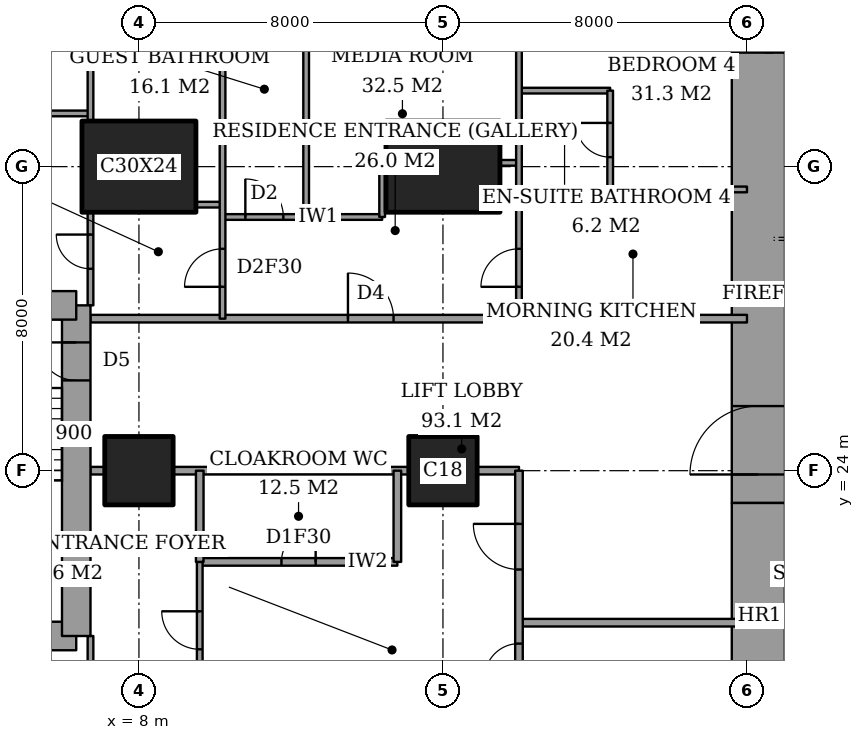
"""IFC4 building model, lengths in metres.
Left out: names, types, materials, properties, quantities, classifications, styles, units other than length and angle.
Written with IfcOpenShell. Run it as: python <this file> out.ifc"""

import sys

from ifc_helpers import new_model, si_unit, direction, frame, frame_2d, origin, origin_2d, place, context, subcontext, project, spatial, rectangle, extrude, element, fill, save


model = new_model("IFC4")
c1 = context("Model", 3, precision=1e-05, world=origin(), true_north=direction((0.0, 1.0)))
c2 = subcontext(c1, "Body", "Model", "MODEL_VIEW")
j1 = project(units=[si_unit("LENGTHUNIT", "METRE"), si_unit("PLANEANGLEUNIT", "RADIAN")], contexts=[c1])
p1 = place(None, origin())
s1 = spatial("IfcSite", under=j1, at=p1, CompositionType="ELEMENT")
p2 = place(p1, origin())
s2 = spatial("IfcBuilding", under=s1, at=p2, CompositionType="ELEMENT")
p3 = place(p2, frame((0.0, 0.0, 211.0)))
s3 = spatial("IfcBuildingStorey", under=s2, at=p3, CompositionType="ELEMENT", Elevation=211.0)
p4 = place(p3, frame((8.0, 24.0, 0.0), z_axis=(0.0, 0.0, 1.0), x_axis=(1.0, 0.0, 0.0)))
e1 = element("IfcColumn", 1, at=p4, inside=s3, PredefinedType="COLUMN", context=c2, shape_type="SweptSolid", body=[
    extrude(rectangle(XDim=1.8, YDim=1.8, at=origin_2d()), origin(), (0.0, 0.0, 1.0), 3.6),
])
p5 = place(p3, frame((8.0, 32.0, 0.0), z_axis=(0.0, 0.0, 1.0), x_axis=(1.0, 0.0, 0.0)))
e2 = element("IfcColumn", 2, at=p5, inside=s3, PredefinedType="COLUMN", context=c2, shape_type="SweptSolid", body=[
    extrude(rectangle(XDim=3.0, YDim=2.4, at=origin_2d()), origin(), (0.0, 0.0, 1.0), 3.6),
])
p6 = place(p3, frame((16.0, 24.0, 0.0), z_axis=(0.0, 0.0, 1.0), x_axis=(1.0, 0.0, 0.0)))
e3 = element("IfcColumn", 3, at=p6, inside=s3, PredefinedType="COLUMN", context=c2, shape_type="SweptSolid", body=[
    extrude(rectangle(XDim=1.8, YDim=1.8, at=origin_2d()), origin(), (0.0, 0.0, 1.0), 3.6),
])
p7 = place(p3, frame((16.0, 32.0, 0.0), z_axis=(0.0, 0.0, 1.0), x_axis=(1.0, 0.0, 0.0)))
e4 = element("IfcColumn", 4, at=p7, inside=s3, PredefinedType="COLUMN", context=c2, shape_type="SweptSolid", body=[
    extrude(rectangle(XDim=3.0, YDim=2.4, at=origin_2d()), origin(), (0.0, 0.0, 1.0), 3.6),
])
p8 = place(p3, frame((24.3, 13.0, 0.0), z_axis=(0.0, 0.0, 1.0), x_axis=(0.0, 1.0, 0.0)))
e5 = element("IfcWall", 5, at=p8, inside=s3, PredefinedType="SHEAR", context=c2, shape_type="SweptSolid", body=[
    extrude(rectangle(XDim=10.15, YDim=1.4, at=frame_2d((5.075, 0.0))), origin(), (0.0, 0.0, 1.0), 3.6),
])
p9 = place(p3, frame((24.3, 23.15, 0.0), z_axis=(0.0, 0.0, 1.0), x_axis=(0.0, 1.0, 0.0)))
e6 = element("IfcWall", 6, at=p9, inside=s3, PredefinedType="SHEAR", context=c2, shape_type="SweptSolid", body=[
    extrude(rectangle(XDim=11.85, YDim=1.4, at=frame_2d((5.925, 0.0))), origin(), (0.0, 0.0, 1.0), 3.6),
])
p10 = place(p9, frame((0.75, 0.0, 0.0)))
e7 = element("IfcOpeningElement", 7, at=p10, cuts=e6, PredefinedType="OPENING", context=c2, shape_type="SweptSolid", body=[
    extrude(rectangle(XDim=1.8, YDim=2.4, at=frame_2d((0.9, 1.2))), frame((0.0, 0.71, 0.0), z_axis=(0.0, -1.0, 0.0), x_axis=(1.0, 0.0, 0.0)), (0.0, 0.0, 1.0), 1.42),
])
p11 = place(p3, frame((1.9, 19.65, 0.0), z_axis=(0.0, 0.0, 1.0), x_axis=(1.0, 0.0, 0.0)))
e8 = element("IfcWall", 8, at=p11, inside=s3, PredefinedType="SHEAR", context=c2, shape_type="SweptSolid", body=[
    extrude(rectangle(XDim=4.45, YDim=0.75, at=frame_2d((2.225, 0.0))), origin(), (0.0, 0.0, 1.0), 3.6),
])
p12 = place(p3, frame((6.35, 19.65, 0.0), z_axis=(0.0, 0.0, 1.0), x_axis=(0.0, 1.0, 0.0)))
e9 = element("IfcWall", 9, at=p12, inside=s3, PredefinedType="SHEAR", context=c2, shape_type="SweptSolid", body=[
    extrude(rectangle(XDim=8.7, YDim=0.75, at=frame_2d((4.35, 0.0))), origin(), (0.0, 0.0, 1.0), 3.6),
])
p13 = place(p12, frame((6.725, 0.0, 0.0)))
e10 = element("IfcOpeningElement", 10, at=p13, cuts=e9, PredefinedType="OPENING", context=c2, shape_type="SweptSolid", body=[
    extrude(rectangle(XDim=1.0, YDim=2.1, at=frame_2d((0.5, 1.05))), frame((0.0, 0.385, 0.0), z_axis=(0.0, -1.0, 0.0), x_axis=(1.0, 0.0, 0.0)), (0.0, 0.0, 1.0), 0.77),
])
p14 = place(p3, frame((6.35, 28.35, 0.0), z_axis=(0.0, 0.0, 1.0), x_axis=(-1.0, 0.0, 0.0)))
e11 = element("IfcWall", 11, at=p14, inside=s3, PredefinedType="SHEAR", context=c2, shape_type="SweptSolid", body=[
    extrude(rectangle(XDim=4.45, YDim=0.75, at=frame_2d((2.225, 0.0))), origin(), (0.0, 0.0, 1.0), 3.6),
])
p15 = place(p3, frame((18.0, 20.0, 0.0), z_axis=(0.0, 0.0, 1.0), x_axis=(1.0, 0.0, 0.0)))
e12 = element("IfcWall", 12, at=p15, inside=s3, PredefinedType="PARTITIONING", context=c2, shape_type="SweptSolid", body=[
    extrude(rectangle(XDim=6.0, YDim=0.2, at=frame_2d((3.0, 0.0))), origin(), (0.0, 0.0, 1.0), 3.35),
])
p16 = place(p3, frame((9.6, 21.6, 0.0), z_axis=(0.0, 0.0, 1.0), x_axis=(1.0, 0.0, 0.0)))
e13 = element("IfcWall", 13, at=p16, inside=s3, PredefinedType="PARTITIONING", context=c2, shape_type="SweptSolid", body=[
    extrude(rectangle(XDim=5.2, YDim=0.2, at=frame_2d((2.6, 0.0))), origin(), (0.0, 0.0, 1.0), 3.35),
])
p17 = place(p16, frame((2.15, 0.0, 0.0)))
e14 = element("IfcOpeningElement", 14, at=p17, cuts=e13, PredefinedType="OPENING", context=c2, shape_type="SweptSolid", body=[
    extrude(rectangle(XDim=0.9, YDim=2.1, at=frame_2d((0.45, 1.05))), frame((0.0, 0.11, 0.0), z_axis=(0.0, -1.0, 0.0), x_axis=(1.0, 0.0, 0.0)), (0.0, 0.0, 1.0), 0.22),
])
p18 = place(p3, frame((6.725, 24.0, 0.0), z_axis=(0.0, 0.0, 1.0), x_axis=(1.0, 0.0, 0.0)))
e15 = element("IfcWall", 15, at=p18, inside=s3, PredefinedType="PARTITIONING", context=c2, shape_type="SweptSolid", body=[
    extrude(rectangle(XDim=0.375, YDim=0.2, at=frame_2d((0.188, 0.0))), origin(), (0.0, 0.0, 1.0), 3.35),
])
p19 = place(p3, frame((8.9, 24.0, 0.0), z_axis=(0.0, 0.0, 1.0), x_axis=(1.0, 0.0, 0.0)))
e16 = element("IfcWall", 16, at=p19, inside=s3, PredefinedType="PARTITIONING", context=c2, shape_type="SweptSolid", body=[
    extrude(rectangle(XDim=6.2, YDim=0.2, at=frame_2d((3.1, 0.0))), origin(), (0.0, 0.0, 1.0), 3.35),
])
p20 = place(p3, frame((16.9, 24.0, 0.0), z_axis=(0.0, 0.0, 1.0), x_axis=(1.0, 0.0, 0.0)))
e17 = element("IfcWall", 17, at=p20, inside=s3, PredefinedType="PARTITIONING", context=c2, shape_type="SweptSolid", body=[
    extrude(rectangle(XDim=1.1, YDim=0.2, at=frame_2d((0.55, 0.0))), origin(), (0.0, 0.0, 1.0), 3.35),
])
p21 = place(p3, frame((6.725, 28.0, 0.0), z_axis=(0.0, 0.0, 1.0), x_axis=(1.0, 0.0, 0.0)))
e18 = element("IfcWall", 18, at=p21, inside=s3, PredefinedType="PARTITIONING", context=c2, shape_type="SweptSolid", body=[
    extrude(rectangle(XDim=17.275, YDim=0.2, at=frame_2d((8.637, 0.0))), origin(), (0.0, 0.0, 1.0), 3.35),
])
p22 = place(p21, frame((6.775, 0.0, 0.0)))
e19 = element("IfcOpeningElement", 19, at=p22, cuts=e18, PredefinedType="OPENING", context=c2, shape_type="SweptSolid", body=[
    extrude(rectangle(XDim=1.2, YDim=2.4, at=frame_2d((0.6, 1.2))), frame((0.0, 0.11, 0.0), z_axis=(0.0, -1.0, 0.0), x_axis=(1.0, 0.0, 0.0)), (0.0, 0.0, 1.0), 0.22),
])
p23 = place(p3, frame((10.2, 30.675, 0.0), z_axis=(0.0, 0.0, 1.0), x_axis=(1.0, 0.0, 0.0)))
e20 = element("IfcWall", 20, at=p23, inside=s3, PredefinedType="PARTITIONING", context=c2, shape_type="SweptSolid", body=[
    extrude(rectangle(XDim=4.2, YDim=0.15, at=frame_2d((2.1, 0.0))), origin(), (0.0, 0.0, 1.0), 3.35),
])
p24 = place(p23, frame((0.6, 0.0, 0.0)))
e21 = element("IfcOpeningElement", 21, at=p24, cuts=e20, PredefinedType="OPENING", context=c2, shape_type="SweptSolid", body=[
    extrude(rectangle(XDim=1.0, YDim=2.1, at=frame_2d((0.5, 1.05))), frame((0.0, 0.085, 0.0), z_axis=(0.0, -1.0, 0.0), x_axis=(1.0, 0.0, 0.0)), (0.0, 0.0, 1.0), 0.17),
])
p25 = place(p3, frame((9.5, 31.0, 0.0), z_axis=(0.0, 0.0, 1.0), x_axis=(1.0, 0.0, 0.0)))
e22 = element("IfcWall", 22, at=p25, inside=s3, PredefinedType="PARTITIONING", context=c2, shape_type="SweptSolid", body=[
    extrude(rectangle(XDim=0.7, YDim=0.15, at=frame_2d((0.35, 0.0))), origin(), (0.0, 0.0, 1.0), 3.35),
])
p26 = place(p3, frame((18.0, 31.4, 0.0), z_axis=(0.0, 0.0, 1.0), x_axis=(1.0, 0.0, 0.0)))
e23 = element("IfcWall", 23, at=p26, inside=s3, PredefinedType="PARTITIONING", context=c2, shape_type="SweptSolid", body=[
    extrude(rectangle(XDim=6.0, YDim=0.15, at=frame_2d((3.0, 0.0))), origin(), (0.0, 0.0, 1.0), 3.35),
])
p27 = place(p3, frame((17.5, 32.1, 0.0), z_axis=(0.0, 0.0, 1.0), x_axis=(1.0, 0.0, 0.0)))
e24 = element("IfcWall", 24, at=p27, inside=s3, PredefinedType="PARTITIONING", context=c2, shape_type="SweptSolid", body=[
    extrude(rectangle(XDim=0.5, YDim=0.15, at=frame_2d((0.25, 0.0))), origin(), (0.0, 0.0, 1.0), 2.634),
])
p28 = place(p3, frame((-0.45, 33.4, 0.0), z_axis=(0.0, 0.0, 1.0), x_axis=(1.0, 0.0, 0.0)))
e25 = element("IfcWall", 25, at=p28, inside=s3, PredefinedType="PARTITIONING", context=c2, shape_type="SweptSolid", body=[
    extrude(rectangle(XDim=7.175, YDim=0.15, at=frame_2d((3.587, 0.0))), origin(), (0.0, 0.0, 1.0), 3.35),
])
p29 = place(p3, frame((18.0, 34.0, 0.0), z_axis=(0.0, 0.0, 1.0), x_axis=(1.0, 0.0, 0.0)))
e26 = element("IfcWall", 26, at=p29, inside=s3, PredefinedType="PARTITIONING", context=c2, shape_type="SweptSolid", body=[
    extrude(rectangle(XDim=2.4, YDim=0.15, at=frame_2d((1.2, 0.0))), origin(), (0.0, 0.0, 1.0), 3.35),
])
p30 = place(p3, frame((6.725, 17.2, 0.0), z_axis=(0.0, 0.0, 1.0), x_axis=(0.0, 1.0, 0.0)))
e27 = element("IfcWall", 27, at=p30, inside=s3, PredefinedType="PARTITIONING", context=c2, shape_type="SweptSolid", body=[
    extrude(rectangle(XDim=2.45, YDim=0.15, at=frame_2d((1.225, 0.0))), origin(), (0.0, 0.0, 1.0), 3.35),
])
p31 = place(p30, frame((0.587, 0.0, 0.0)))
e28 = element("IfcOpeningElement", 28, at=p31, cuts=e27, PredefinedType="OPENING", context=c2, shape_type="SweptSolid", body=[
    extrude(rectangle(XDim=0.9, YDim=2.1, at=frame_2d((0.45, 1.05))), frame((0.0, 0.085, 0.0), z_axis=(0.0, -1.0, 0.0), x_axis=(1.0, 0.0, 0.0)), (0.0, 0.0, 1.0), 0.17),
])
p32 = place(p3, frame((6.725, 28.35, 0.0), z_axis=(0.0, 0.0, 1.0), x_axis=(0.0, 1.0, 0.0)))
e29 = element("IfcWall", 29, at=p32, inside=s3, PredefinedType="PARTITIONING", context=c2, shape_type="SweptSolid", body=[
    extrude(rectangle(XDim=2.45, YDim=0.15, at=frame_2d((1.225, 0.0))), origin(), (0.0, 0.0, 1.0), 3.35),
])
p33 = place(p32, frame((0.962, 0.0, 0.0)))
e30 = element("IfcOpeningElement", 30, at=p33, cuts=e29, PredefinedType="OPENING", context=c2, shape_type="SweptSolid", body=[
    extrude(rectangle(XDim=0.9, YDim=2.1, at=frame_2d((0.45, 1.05))), frame((0.0, 0.085, 0.0), z_axis=(0.0, -1.0, 0.0), x_axis=(1.0, 0.0, 0.0)), (0.0, 0.0, 1.0), 0.17),
])
p34 = place(p3, frame((6.725, 33.2, 0.0), z_axis=(0.0, 0.0, 1.0), x_axis=(0.0, 1.0, 0.0)))
e31 = element("IfcWall", 31, at=p34, inside=s3, PredefinedType="PARTITIONING", context=c2, shape_type="SweptSolid", body=[
    extrude(rectangle(XDim=4.2, YDim=0.15, at=frame_2d((2.1, 0.0))), origin(), (0.0, 0.0, 1.0), 3.35),
])
p35 = place(p3, frame((9.6, 21.6, 0.0), z_axis=(0.0, 0.0, 1.0), x_axis=(0.0, 1.0, 0.0)))
e32 = element("IfcWall", 32, at=p35, inside=s3, PredefinedType="PARTITIONING", context=c2, shape_type="SweptSolid", body=[
    extrude(rectangle(XDim=2.4, YDim=0.2, at=frame_2d((1.2, 0.0))), origin(), (0.0, 0.0, 1.0), 3.35),
])
p36 = place(p3, frame((9.6, 10.6, 0.0), z_axis=(0.0, 0.0, 1.0), x_axis=(0.0, 1.0, 0.0)))
e33 = element("IfcWall", 33, at=p36, inside=s3, PredefinedType="PARTITIONING", context=c2, shape_type="SweptSolid", body=[
    extrude(rectangle(XDim=11.0, YDim=0.15, at=frame_2d((5.5, 0.0))), origin(), (0.0, 0.0, 1.0), 3.35),
])
p37 = place(p36, frame((8.7, 0.0, 0.0)))
e34 = element("IfcOpeningElement", 34, at=p37, cuts=e33, PredefinedType="OPENING", context=c2, shape_type="SweptSolid", body=[
    extrude(rectangle(XDim=1.0, YDim=2.1, at=frame_2d((0.5, 1.05))), frame((0.0, 0.085, 0.0), z_axis=(0.0, -1.0, 0.0), x_axis=(1.0, 0.0, 0.0)), (0.0, 0.0, 1.0), 0.17),
])
p38 = place(p3, frame((10.2, 28.0, 0.0), z_axis=(0.0, 0.0, 1.0), x_axis=(0.0, 1.0, 0.0)))
e35 = element("IfcWall", 35, at=p38, inside=s3, PredefinedType="PARTITIONING", context=c2, shape_type="SweptSolid", body=[
    extrude(rectangle(XDim=9.4, YDim=0.15, at=frame_2d((4.7, 0.0))), origin(), (0.0, 0.0, 1.0), 3.35),
])
p39 = place(p38, frame((0.837, 0.0, 0.0)))
e36 = element("IfcOpeningElement", 36, at=p39, cuts=e35, PredefinedType="OPENING", context=c2, shape_type="SweptSolid", body=[
    extrude(rectangle(XDim=1.0, YDim=2.1, at=frame_2d((0.5, 1.05))), frame((0.0, 0.085, 0.0), z_axis=(0.0, -1.0, 0.0), x_axis=(1.0, 0.0, 0.0)), (0.0, 0.0, 1.0), 0.17),
])
p40 = place(p3, frame((12.4, 30.675, 0.0), z_axis=(0.0, 0.0, 1.0), x_axis=(0.0, 1.0, 0.0)))
e37 = element("IfcWall", 37, at=p40, inside=s3, PredefinedType="PARTITIONING", context=c2, shape_type="SweptSolid", body=[
    extrude(rectangle(XDim=6.725, YDim=0.15, at=frame_2d((3.362, 0.0))), origin(), (0.0, 0.0, 1.0), 3.35),
])
p41 = place(p3, frame((14.4, 30.675, 0.0), z_axis=(0.0, 0.0, 1.0), x_axis=(0.0, 1.0, 0.0)))
e38 = element("IfcWall", 38, at=p41, inside=s3, PredefinedType="PARTITIONING", context=c2, shape_type="SweptSolid", body=[
    extrude(rectangle(XDim=1.425, YDim=0.15, at=frame_2d((0.712, 0.0))), origin(), (0.0, 0.0, 1.0), 3.35),
])
p42 = place(p3, frame((14.8, 21.6, 0.0), z_axis=(0.0, 0.0, 1.0), x_axis=(0.0, 1.0, 0.0)))
e39 = element("IfcWall", 39, at=p42, inside=s3, PredefinedType="PARTITIONING", context=c2, shape_type="SweptSolid", body=[
    extrude(rectangle(XDim=2.4, YDim=0.2, at=frame_2d((1.2, 0.0))), origin(), (0.0, 0.0, 1.0), 3.35),
])
p43 = place(p3, frame((18.0, 18.0, 0.0), z_axis=(0.0, 0.0, 1.0), x_axis=(0.0, 1.0, 0.0)))
e40 = element("IfcWall", 40, at=p43, inside=s3, PredefinedType="PARTITIONING", context=c2, shape_type="SweptSolid", body=[
    extrude(rectangle(XDim=6.0, YDim=0.2, at=frame_2d((3.0, 0.0))), origin(), (0.0, 0.0, 1.0), 3.35),
])
p44 = place(p43, frame((3.4, 0.0, 0.0)))
e41 = element("IfcOpeningElement", 41, at=p44, cuts=e40, PredefinedType="OPENING", context=c2, shape_type="SweptSolid", body=[
    extrude(rectangle(XDim=1.2, YDim=2.4, at=frame_2d((0.6, 1.2))), frame((0.0, 0.11, 0.0), z_axis=(0.0, -1.0, 0.0), x_axis=(1.0, 0.0, 0.0)), (0.0, 0.0, 1.0), 0.22),
])
p45 = place(p43, frame((0.55, 0.0, 0.0)))
e42 = element("IfcOpeningElement", 42, at=p45, cuts=e40, PredefinedType="OPENING", context=c2, shape_type="SweptSolid", body=[
    extrude(rectangle(XDim=0.9, YDim=2.1, at=frame_2d((0.45, 1.05))), frame((0.0, 0.11, 0.0), z_axis=(0.0, -1.0, 0.0), x_axis=(1.0, 0.0, 0.0)), (0.0, 0.0, 1.0), 0.22),
])
p46 = place(p3, frame((18.0, 28.0, 0.0), z_axis=(0.0, 0.0, 1.0), x_axis=(0.0, 1.0, 0.0)))
e43 = element("IfcWall", 43, at=p46, inside=s3, PredefinedType="PARTITIONING", context=c2, shape_type="SweptSolid", body=[
    extrude(rectangle(XDim=9.4, YDim=0.15, at=frame_2d((4.7, 0.0))), origin(), (0.0, 0.0, 1.0), 3.35),
])
p47 = place(p46, frame((0.837, 0.0, 0.0)))
e44 = element("IfcOpeningElement", 44, at=p47, cuts=e43, PredefinedType="OPENING", context=c2, shape_type="SweptSolid", body=[
    extrude(rectangle(XDim=1.0, YDim=2.1, at=frame_2d((0.5, 1.05))), frame((0.0, 0.085, 0.0), z_axis=(0.0, -1.0, 0.0), x_axis=(1.0, 0.0, 0.0)), (0.0, 0.0, 1.0), 0.17),
])
p48 = place(p3, frame((20.4, 31.4, 0.0), z_axis=(0.0, 0.0, 1.0), x_axis=(0.0, 1.0, 0.0)))
e45 = element("IfcWall", 45, at=p48, inside=s3, PredefinedType="PARTITIONING", context=c2, shape_type="SweptSolid", body=[
    extrude(rectangle(XDim=2.6, YDim=0.15, at=frame_2d((1.3, 0.0))), origin(), (0.0, 0.0, 1.0), 3.35),
])
p49 = place(p48, frame((0.85, 0.0, 0.0)))
e46 = element("IfcOpeningElement", 46, at=p49, cuts=e45, PredefinedType="OPENING", context=c2, shape_type="SweptSolid", body=[
    extrude(rectangle(XDim=0.9, YDim=2.1, at=frame_2d((0.45, 1.05))), frame((0.0, 0.085, 0.0), z_axis=(0.0, -1.0, 0.0), x_axis=(1.0, 0.0, 0.0)), (0.0, 0.0, 1.0), 0.17),
])
p50 = place(p37, origin())
e47 = element("IfcDoor", 47, at=p50, inside=s3, OperationType="SINGLE_SWING_LEFT", PredefinedType="DOOR", context=c2, shape_type="SweptSolid", body=[
    extrude(rectangle(XDim=1.0, YDim=2.1, at=frame_2d((0.5, 1.05))), frame((0.0, 0.025, 0.0), z_axis=(0.0, -1.0, 0.0), x_axis=(1.0, 0.0, 0.0)), (0.0, 0.0, 1.0), 0.05),
])
fill(e34, e47)
p51 = place(p17, origin())
e48 = element("IfcDoor", 48, at=p51, inside=s3, OperationType="SINGLE_SWING_LEFT", PredefinedType="DOOR", context=c2, shape_type="SweptSolid", body=[
    extrude(rectangle(XDim=0.9, YDim=2.1, at=frame_2d((0.45, 1.05))), frame((0.0, 0.025, 0.0), z_axis=(0.0, -1.0, 0.0), x_axis=(1.0, 0.0, 0.0)), (0.0, 0.0, 1.0), 0.05),
])
fill(e14, e48)
p52 = place(p44, origin())
e49 = element("IfcDoor", 49, at=p52, inside=s3, OperationType="SINGLE_SWING_LEFT", PredefinedType="DOOR", context=c2, shape_type="SweptSolid", body=[
    extrude(rectangle(XDim=1.2, YDim=2.4, at=frame_2d((0.6, 1.2))), frame((0.0, 0.025, 0.0), z_axis=(0.0, -1.0, 0.0), x_axis=(1.0, 0.0, 0.0)), (0.0, 0.0, 1.0), 0.05),
])
fill(e41, e49)
p53 = place(p45, origin())
e50 = element("IfcDoor", 50, at=p53, inside=s3, OperationType="SINGLE_SWING_RIGHT", PredefinedType="DOOR", context=c2, shape_type="SweptSolid", body=[
    extrude(rectangle(XDim=0.9, YDim=2.1, at=frame_2d((0.45, 1.05))), frame((0.0, 0.025, 0.0), z_axis=(0.0, -1.0, 0.0), x_axis=(1.0, 0.0, 0.0)), (0.0, 0.0, 1.0), 0.05),
])
fill(e42, e50)
p54 = place(p33, origin())
e51 = element("IfcDoor", 51, at=p54, inside=s3, OperationType="SINGLE_SWING_LEFT", PredefinedType="DOOR", context=c2, shape_type="SweptSolid", body=[
    extrude(rectangle(XDim=0.9, YDim=2.1, at=frame_2d((0.45, 1.05))), frame((0.0, 0.025, 0.0), z_axis=(0.0, -1.0, 0.0), x_axis=(1.0, 0.0, 0.0)), (0.0, 0.0, 1.0), 0.05),
])
fill(e30, e51)
p55 = place(p39, origin())
e52 = element("IfcDoor", 52, at=p55, inside=s3, OperationType="SINGLE_SWING_RIGHT", PredefinedType="DOOR", context=c2, shape_type="SweptSolid", body=[
    extrude(rectangle(XDim=1.0, YDim=2.1, at=frame_2d((0.5, 1.05))), frame((0.0, 0.025, 0.0), z_axis=(0.0, -1.0, 0.0), x_axis=(1.0, 0.0, 0.0)), (0.0, 0.0, 1.0), 0.05),
])
fill(e36, e52)
p56 = place(p22, origin())
e53 = element("IfcDoor", 53, at=p56, inside=s3, OperationType="SINGLE_SWING_RIGHT", PredefinedType="DOOR", context=c2, shape_type="SweptSolid", body=[
    extrude(rectangle(XDim=1.2, YDim=2.4, at=frame_2d((0.6, 1.2))), frame((0.0, 0.025, 0.0), z_axis=(0.0, -1.0, 0.0), x_axis=(1.0, 0.0, 0.0)), (0.0, 0.0, 1.0), 0.05),
])
fill(e19, e53)
p57 = place(p24, origin())
e54 = element("IfcDoor", 54, at=p57, inside=s3, OperationType="SINGLE_SWING_RIGHT", PredefinedType="DOOR", context=c2, shape_type="SweptSolid", body=[
    extrude(rectangle(XDim=1.0, YDim=2.1, at=frame_2d((0.5, 1.05))), frame((0.0, 0.025, 0.0), z_axis=(0.0, -1.0, 0.0), x_axis=(1.0, 0.0, 0.0)), (0.0, 0.0, 1.0), 0.05),
])
fill(e21, e54)
p58 = place(p49, origin())
e55 = element("IfcDoor", 55, at=p58, inside=s3, OperationType="SINGLE_SWING_LEFT", PredefinedType="DOOR", context=c2, shape_type="SweptSolid", body=[
    extrude(rectangle(XDim=0.9, YDim=2.1, at=frame_2d((0.45, 1.05))), frame((0.0, 0.025, 0.0), z_axis=(0.0, -1.0, 0.0), x_axis=(1.0, 0.0, 0.0)), (0.0, 0.0, 1.0), 0.05),
])
fill(e46, e55)
p59 = place(p47, origin())
e56 = element("IfcDoor", 56, at=p59, inside=s3, OperationType="SINGLE_SWING_RIGHT", PredefinedType="DOOR", context=c2, shape_type="SweptSolid", body=[
    extrude(rectangle(XDim=1.0, YDim=2.1, at=frame_2d((0.5, 1.05))), frame((0.0, 0.025, 0.0), z_axis=(0.0, -1.0, 0.0), x_axis=(1.0, 0.0, 0.0)), (0.0, 0.0, 1.0), 0.05),
])
fill(e44, e56)
p60 = place(p10, origin())
e57 = element("IfcDoor", 57, at=p60, inside=s3, OperationType="DOUBLE_DOOR_DOUBLE_SWING", PredefinedType="DOOR", context=c2, shape_type="SweptSolid", body=[
    extrude(rectangle(XDim=1.8, YDim=2.4, at=frame_2d((0.9, 1.2))), frame((0.0, 0.025, 0.0), z_axis=(0.0, -1.0, 0.0), x_axis=(1.0, 0.0, 0.0)), (0.0, 0.0, 1.0), 0.05),
])
fill(e7, e57)
p61 = place(p13, origin())
e58 = element("IfcDoor", 58, at=p61, inside=s3, OperationType="SINGLE_SWING_LEFT", PredefinedType="DOOR", context=c2, shape_type="SweptSolid", body=[
    extrude(rectangle(XDim=1.0, YDim=2.1, at=frame_2d((0.5, 1.05))), frame((0.0, 0.025, 0.0), z_axis=(0.0, -1.0, 0.0), x_axis=(1.0, 0.0, 0.0)), (0.0, 0.0, 1.0), 0.05),
])
fill(e10, e58)
save(model, sys.argv[1])
